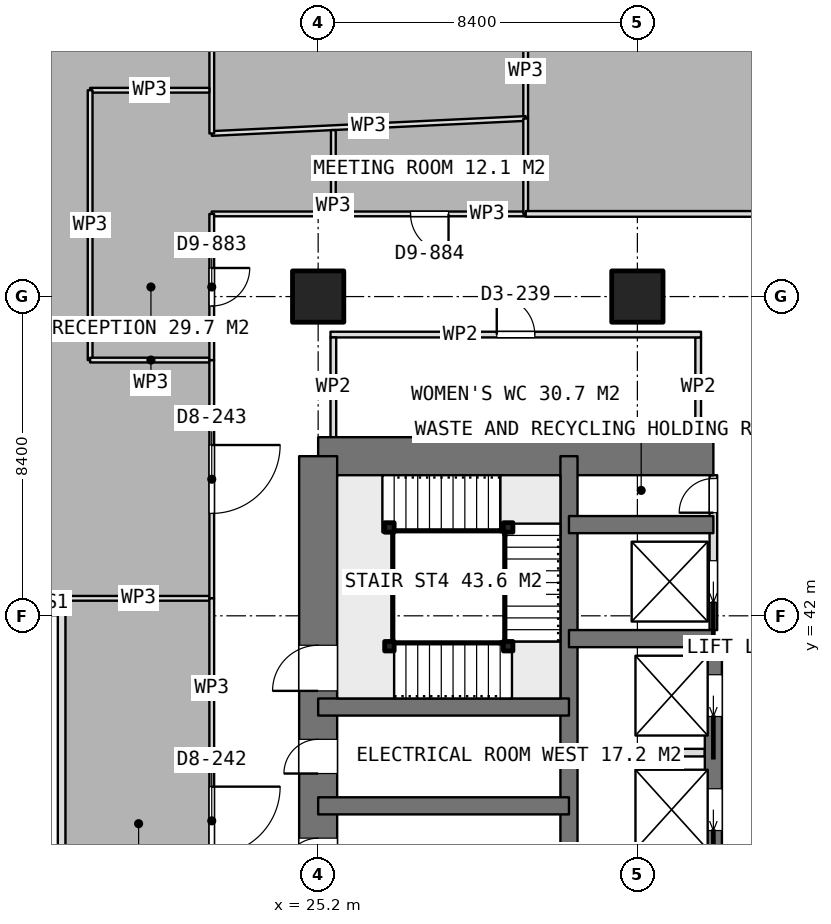
"""IFC4 building model, lengths in metres.
Left out: names, types, materials, properties, quantities, classifications, styles, units other than length and angle.
Written with IfcOpenShell. Run it as: python <this file> out.ifc"""

import sys

from ifc_helpers import new_model, si_unit, direction, frame, frame_2d, origin, origin_2d, place, context, subcontext, project, spatial, rectangle, extrude, element, fill, save


model = new_model("IFC4")
c1 = context("Model", 3, precision=1e-05, world=origin(), true_north=direction((0.0, 1.0)))
c2 = subcontext(c1, "Body", "Model", "MODEL_VIEW")
j1 = project(units=[si_unit("LENGTHUNIT", "METRE"), si_unit("PLANEANGLEUNIT", "RADIAN")], contexts=[c1])
p1 = place(None, origin())
s1 = spatial("IfcSite", under=j1, at=p1, CompositionType="ELEMENT")
p2 = place(p1, origin())
s2 = spatial("IfcBuilding", under=s1, at=p2, CompositionType="ELEMENT")
p3 = place(p2, frame((0.0, 0.0, 221.45)))
s3 = spatial("IfcBuildingStorey", under=s2, at=p3, CompositionType="ELEMENT", Elevation=221.45)
p4 = place(p3, frame((25.2, 46.2, 0.0), z_axis=(0.0, 0.0, 1.0), x_axis=(1.0, 0.0, 0.0)))
e1 = element("IfcWall", 1, at=p4, inside=s3, PredefinedType="SHEAR", context=c2, shape_type="SweptSolid", body=[
    extrude(rectangle(XDim=10.4, YDim=1.0, at=frame_2d((5.2, 0.0))), origin(), (0.0, 0.0, 1.0), 3.75),
])
p5 = place(p3, frame((25.2, 21.0, 0.0), z_axis=(0.0, 0.0, 1.0), x_axis=(0.0, 1.0, 0.0)))
e2 = element("IfcWall", 2, at=p5, inside=s3, PredefinedType="SHEAR", context=c2, shape_type="SweptSolid", body=[
    extrude(rectangle(XDim=25.2, YDim=1.0, at=frame_2d((12.6, 0.0))), origin(), (0.0, 0.0, 1.0), 3.75),
])
p6 = place(p5, frame((7.8, 0.0, 0.0)))
e3 = element("IfcOpeningElement", 3, at=p6, cuts=e2, PredefinedType="OPENING", context=c2, shape_type="SweptSolid", body=[
    extrude(rectangle(XDim=1.2, YDim=2.1, at=frame_2d((0.6, 1.05))), frame((0.0, 0.51, 0.0), z_axis=(0.0, -1.0, 0.0), x_axis=(1.0, 0.0, 0.0)), (0.0, 0.0, 1.0), 1.02),
])
p7 = place(p5, frame((14.25, 0.0, 0.0)))
e4 = element("IfcOpeningElement", 4, at=p7, cuts=e2, PredefinedType="OPENING", context=c2, shape_type="SweptSolid", body=[
    extrude(rectangle(XDim=0.9, YDim=2.1, at=frame_2d((0.45, 1.05))), frame((0.0, 0.51, 0.0), z_axis=(0.0, -1.0, 0.0), x_axis=(1.0, 0.0, 0.0)), (0.0, 0.0, 1.0), 1.02),
])
p8 = place(p5, frame((16.85, 0.0, 0.0)))
e5 = element("IfcOpeningElement", 5, at=p8, cuts=e2, PredefinedType="OPENING", context=c2, shape_type="SweptSolid", body=[
    extrude(rectangle(XDim=0.9, YDim=2.1, at=frame_2d((0.45, 1.05))), frame((0.0, 0.51, 0.0), z_axis=(0.0, -1.0, 0.0), x_axis=(1.0, 0.0, 0.0)), (0.0, 0.0, 1.0), 1.02),
])
p9 = place(p5, frame((19.025, 0.0, 0.0)))
e6 = element("IfcOpeningElement", 6, at=p9, cuts=e2, PredefinedType="OPENING", context=c2, shape_type="SweptSolid", body=[
    extrude(rectangle(XDim=1.2, YDim=2.1, at=frame_2d((0.6, 1.05))), frame((0.0, 0.51, 0.0), z_axis=(0.0, -1.0, 0.0), x_axis=(1.0, 0.0, 0.0)), (0.0, 0.0, 1.0), 1.02),
])
p10 = place(p3, frame((31.8, 21.0, 0.0), z_axis=(0.0, 0.0, 1.0), x_axis=(0.0, 1.0, 0.0)))
e7 = element("IfcWall", 7, at=p10, inside=s3, PredefinedType="SHEAR", context=c2, shape_type="SweptSolid", body=[
    extrude(rectangle(XDim=25.2, YDim=0.45, at=frame_2d((12.6, 0.0))), origin(), (0.0, 0.0, 1.0), 3.75),
])
p11 = place(p3, frame((35.6, 23.4, 0.0), z_axis=(0.0, 0.0, 1.0), x_axis=(0.0, 1.0, 0.0)))
e8 = element("IfcWall", 8, at=p11, inside=s3, PredefinedType="SHEAR", context=c2, shape_type="SweptSolid", body=[
    extrude(rectangle(XDim=18.0, YDim=0.45, at=frame_2d((9.0, 0.0))), origin(), (0.0, 0.0, 1.0), 3.75),
])
p12 = place(p11, frame((0.95, 0.0, 0.0)))
e9 = element("IfcOpeningElement", 9, at=p12, cuts=e8, PredefinedType="OPENING", context=c2, shape_type="SweptSolid", body=[
    extrude(rectangle(XDim=1.1, YDim=2.1, at=frame_2d((0.55, 1.05))), frame((0.0, 0.235, 0.0), z_axis=(0.0, -1.0, 0.0), x_axis=(1.0, 0.0, 0.0)), (0.0, 0.0, 1.0), 0.47),
])
p13 = place(p11, frame((3.95, 0.0, 0.0)))
e10 = element("IfcOpeningElement", 10, at=p13, cuts=e8, PredefinedType="OPENING", context=c2, shape_type="SweptSolid", body=[
    extrude(rectangle(XDim=1.1, YDim=2.1, at=frame_2d((0.55, 1.05))), frame((0.0, 0.235, 0.0), z_axis=(0.0, -1.0, 0.0), x_axis=(1.0, 0.0, 0.0)), (0.0, 0.0, 1.0), 0.47),
])
p14 = place(p11, frame((6.95, 0.0, 0.0)))
e11 = element("IfcOpeningElement", 11, at=p14, cuts=e8, PredefinedType="OPENING", context=c2, shape_type="SweptSolid", body=[
    extrude(rectangle(XDim=1.1, YDim=2.1, at=frame_2d((0.55, 1.05))), frame((0.0, 0.235, 0.0), z_axis=(0.0, -1.0, 0.0), x_axis=(1.0, 0.0, 0.0)), (0.0, 0.0, 1.0), 0.47),
])
p15 = place(p11, frame((9.95, 0.0, 0.0)))
e12 = element("IfcOpeningElement", 12, at=p15, cuts=e8, PredefinedType="OPENING", context=c2, shape_type="SweptSolid", body=[
    extrude(rectangle(XDim=1.1, YDim=2.1, at=frame_2d((0.55, 1.05))), frame((0.0, 0.235, 0.0), z_axis=(0.0, -1.0, 0.0), x_axis=(1.0, 0.0, 0.0)), (0.0, 0.0, 1.0), 0.47),
])
p16 = place(p11, frame((12.95, 0.0, 0.0)))
e13 = element("IfcOpeningElement", 13, at=p16, cuts=e8, PredefinedType="OPENING", context=c2, shape_type="SweptSolid", body=[
    extrude(rectangle(XDim=1.1, YDim=2.1, at=frame_2d((0.55, 1.05))), frame((0.0, 0.235, 0.0), z_axis=(0.0, -1.0, 0.0), x_axis=(1.0, 0.0, 0.0)), (0.0, 0.0, 1.0), 0.47),
])
p17 = place(p11, frame((15.95, 0.0, 0.0)))
e14 = element("IfcOpeningElement", 14, at=p17, cuts=e8, PredefinedType="OPENING", context=c2, shape_type="SweptSolid", body=[
    extrude(rectangle(XDim=1.1, YDim=2.1, at=frame_2d((0.55, 1.05))), frame((0.0, 0.235, 0.0), z_axis=(0.0, -1.0, 0.0), x_axis=(1.0, 0.0, 0.0)), (0.0, 0.0, 1.0), 0.47),
])
for number, where, z_axis, x_axis in (
    (15, (31.8, 41.4, 0.0), (0.0, 0.0, 1.0), (1.0, 0.0, 0.0)),
    (16, (31.8, 44.4, 0.0), (0.0, 0.0, 1.0), (1.0, 0.0, 0.0)),
):
    element("IfcWall", number, at=place(p3, frame(where, z_axis=z_axis, x_axis=x_axis)), inside=s3, PredefinedType="SHEAR", context=c2, shape_type="SweptSolid", body=[
        extrude(rectangle(XDim=3.8, YDim=0.45, at=frame_2d((1.9, 0.0))), origin(), (0.0, 0.0, 1.0), 3.75),
    ])
for number, where, z_axis, x_axis in (
    (17, (25.2, 37.0, 0.0), (0.0, 0.0, 1.0), (1.0, 0.0, 0.0)),
    (18, (25.2, 39.6, 0.0), (0.0, 0.0, 1.0), (1.0, 0.0, 0.0)),
):
    element("IfcWall", number, at=place(p3, frame(where, z_axis=z_axis, x_axis=x_axis)), inside=s3, PredefinedType="SHEAR", context=c2, shape_type="SweptSolid", body=[
        extrude(rectangle(XDim=6.6, YDim=0.45, at=frame_2d((3.3, 0.0))), origin(), (0.0, 0.0, 1.0), 3.75),
    ])
for number, where, z_axis, x_axis in (
    (19, (25.2, 50.4, 0.0), (0.0, 0.0, 1.0), (1.0, 0.0, 0.0)),
    (20, (33.6, 50.4, 0.0), (0.0, 0.0, 1.0), (1.0, 0.0, 0.0)),
):
    element("IfcColumn", number, at=place(p3, frame(where, z_axis=z_axis, x_axis=x_axis)), inside=s3, PredefinedType="COLUMN", context=c2, shape_type="SweptSolid", body=[
        extrude(rectangle(XDim=1.35, YDim=1.35, at=origin_2d()), origin(), (0.0, 0.0, 1.0), 3.75),
    ])
p18 = place(p3, frame((32.025, 38.4, 0.0), z_axis=(0.0, 0.0, 1.0), x_axis=(1.0, 0.0, 0.0)))
e21 = element("IfcWall", 21, at=p18, inside=s3, PredefinedType="PARTITIONING", context=c2, shape_type="SweptSolid", body=[
    extrude(rectangle(XDim=3.35, YDim=0.2, at=frame_2d((1.675, 0.0))), origin(), (0.0, 0.0, 1.0), 3.5),
])
p19 = place(p3, frame((35.6, 41.625, 0.0), z_axis=(0.0, 0.0, 1.0), x_axis=(0.0, 1.0, 0.0)))
e22 = element("IfcWall", 22, at=p19, inside=s3, PredefinedType="PARTITIONING", context=c2, shape_type="SweptSolid", body=[
    extrude(rectangle(XDim=4.075, YDim=0.2, at=frame_2d((2.038, 0.0))), origin(), (0.0, 0.0, 1.0), 3.5),
])
p20 = place(p19, frame((3.088, 0.0, 0.0)))
e23 = element("IfcOpeningElement", 23, at=p20, cuts=e22, PredefinedType="OPENING", context=c2, shape_type="SweptSolid", body=[
    extrude(rectangle(XDim=0.9, YDim=2.1, at=frame_2d((0.45, 1.05))), frame((0.0, 0.11, 0.0), z_axis=(0.0, -1.0, 0.0), x_axis=(1.0, 0.0, 0.0)), (0.0, 0.0, 1.0), 0.22),
])
p21 = place(p19, frame((0.725, 0.0, 0.0)))
e24 = element("IfcOpeningElement", 24, at=p21, cuts=e22, PredefinedType="OPENING", context=c2, shape_type="SweptSolid", body=[
    extrude(rectangle(XDim=1.1, YDim=2.1, at=frame_2d((0.55, 1.05))), frame((0.0, 0.11, 0.0), z_axis=(0.0, -1.0, 0.0), x_axis=(1.0, 0.0, 0.0)), (0.0, 0.0, 1.0), 0.22),
])
p22 = place(p3, frame((25.525, 49.4, 0.0), z_axis=(0.0, 0.0, 1.0), x_axis=(1.0, 0.0, 0.0)))
e25 = element("IfcWall", 25, at=p22, inside=s3, PredefinedType="PARTITIONING", context=c2, shape_type="SweptSolid", body=[
    extrude(rectangle(XDim=9.75, YDim=0.15, at=frame_2d((4.875, 0.0))), origin(), (0.0, 0.0, 1.0), 3.5),
])
p23 = place(p22, frame((4.375, 0.0, 0.0)))
e26 = element("IfcOpeningElement", 26, at=p23, cuts=e25, PredefinedType="OPENING", context=c2, shape_type="SweptSolid", body=[
    extrude(rectangle(XDim=1.0, YDim=2.1, at=frame_2d((0.5, 1.05))), frame((0.0, 0.085, 0.0), z_axis=(0.0, -1.0, 0.0), x_axis=(1.0, 0.0, 0.0)), (0.0, 0.0, 1.0), 0.17),
])
for number, where, z_axis, x_axis in (
    (27, (25.6, 46.7, 0.0), (0.0, 0.0, 1.0), (0.0, 1.0, 0.0)),
    (28, (35.2, 46.7, 0.0), (0.0, 0.0, 1.0), (0.0, 1.0, 0.0)),
):
    element("IfcWall", number, at=place(p3, frame(where, z_axis=z_axis, x_axis=x_axis)), inside=s3, PredefinedType="PARTITIONING", context=c2, shape_type="SweptSolid", body=[
        extrude(rectangle(XDim=2.625, YDim=0.15, at=frame_2d((1.312, 0.0))), origin(), (0.0, 0.0, 1.0), 3.5),
    ])
p24 = place(p3, frame((30.661, 61.313, 0.0), z_axis=(0.0, 0.0, 1.0), x_axis=(0.0, -1.0, 0.0)))
e29 = element("IfcWall", 29, at=p24, inside=s3, PredefinedType="PARTITIONING", context=c2, shape_type="SweptSolid", body=[
    extrude(rectangle(XDim=6.227, YDim=0.125, at=frame_2d((3.114, 0.0))), origin(), (0.0, 0.0, 1.0), 3.5),
])
p25 = place(p24, frame((2.614, 0.0, 0.0)))
e30 = element("IfcOpeningElement", 30, at=p25, cuts=e29, PredefinedType="OPENING", context=c2, shape_type="SweptSolid", body=[
    extrude(rectangle(XDim=1.0, YDim=2.1, at=frame_2d((0.5, 1.05))), frame((0.0, 0.073, 0.0), z_axis=(0.0, -1.0, 0.0), x_axis=(1.0, 0.0, 0.0)), (0.0, 0.0, 1.0), 0.145),
])
p26 = place(p3, frame((30.661, 55.086, 0.0), z_axis=(0.0, 0.0, 1.0), x_axis=(-0.998858431805, -0.047768537897, 0.0)))
e31 = element("IfcWall", 31, at=p26, inside=s3, PredefinedType="PARTITIONING", context=c2, shape_type="SweptSolid", body=[
    extrude(rectangle(XDim=8.27, YDim=0.125, at=frame_2d((4.135, 0.0))), origin(), (0.0, 0.0, 1.0), 3.5),
])
p27 = place(p3, frame((22.401, 54.691, 0.0), z_axis=(0.0, 0.0, 1.0), x_axis=(0.0, 1.0, 0.0)))
e32 = element("IfcWall", 32, at=p27, inside=s3, PredefinedType="PARTITIONING", context=c2, shape_type="SweptSolid", body=[
    extrude(rectangle(XDim=6.257, YDim=0.125, at=frame_2d((3.128, 0.0))), origin(), (0.0, 0.0, 1.0), 3.5),
])
p28 = place(p3, frame((22.4, 42.46, 0.0), z_axis=(0.0, 0.0, 1.0), x_axis=(-1.0, 0.0, 0.0)))
e33 = element("IfcWall", 33, at=p28, inside=s3, PredefinedType="PARTITIONING", context=c2, shape_type="SweptSolid", body=[
    extrude(rectangle(XDim=3.849, YDim=0.125, at=frame_2d((1.924, 0.0))), origin(), (0.0, 0.0, 1.0), 3.5),
])
p29 = place(p3, frame((22.338, 55.829, 0.0), z_axis=(0.0, 0.0, 1.0), x_axis=(-1.0, 0.0, 0.0)))
e34 = element("IfcWall", 34, at=p29, inside=s3, PredefinedType="PARTITIONING", context=c2, shape_type="SweptSolid", body=[
    extrude(rectangle(XDim=3.138, YDim=0.125, at=frame_2d((1.569, 0.0))), origin(), (0.0, 0.0, 1.0), 3.5),
])
p30 = place(p3, frame((19.2, 55.829, 0.0), z_axis=(0.0, 0.0, 1.0), x_axis=(0.0, -1.0, 0.0)))
e35 = element("IfcWall", 35, at=p30, inside=s3, PredefinedType="PARTITIONING", context=c2, shape_type="SweptSolid", body=[
    extrude(rectangle(XDim=7.1, YDim=0.125, at=frame_2d((3.55, 0.0))), origin(), (0.0, 0.0, 1.0), 3.5),
])
p31 = place(p3, frame((19.2, 48.729, 0.0), z_axis=(0.0, 0.0, 1.0), x_axis=(1.0, 0.0, 0.0)))
e36 = element("IfcWall", 36, at=p31, inside=s3, PredefinedType="PARTITIONING", context=c2, shape_type="SweptSolid", body=[
    extrude(rectangle(XDim=3.2, YDim=0.125, at=frame_2d((1.6, 0.0))), origin(), (0.0, 0.0, 1.0), 3.5),
])
p32 = place(p3, frame((22.4, 48.729, 0.0), z_axis=(0.0, 0.0, 1.0), x_axis=(0.0, -1.0, 0.0)))
e37 = element("IfcWall", 37, at=p32, inside=s3, PredefinedType="PARTITIONING", context=c2, shape_type="SweptSolid", body=[
    extrude(rectangle(XDim=6.269, YDim=0.125, at=frame_2d((3.135, 0.0))), origin(), (0.0, 0.0, 1.0), 3.5),
])
p33 = place(p32, frame((2.235, 0.0, 0.0)))
e38 = element("IfcOpeningElement", 38, at=p33, cuts=e37, PredefinedType="OPENING", context=c2, shape_type="SweptSolid", body=[
    extrude(rectangle(XDim=1.8, YDim=2.1, at=frame_2d((0.9, 1.05))), frame((0.0, 0.073, 0.0), z_axis=(0.0, -1.0, 0.0), x_axis=(1.0, 0.0, 0.0)), (0.0, 0.0, 1.0), 0.145),
])
p34 = place(p3, frame((25.6, 54.781, 0.0), z_axis=(0.0, 0.0, 1.0), x_axis=(0.0, -1.0, 0.0)))
e39 = element("IfcWall", 39, at=p34, inside=s3, PredefinedType="PARTITIONING", context=c2, shape_type="SweptSolid", body=[
    extrude(rectangle(XDim=2.206, YDim=0.125, at=frame_2d((1.103, 0.0))), origin(), (0.0, 0.0, 1.0), 3.5),
])
p35 = place(p3, frame((25.6, 52.575, 0.0), z_axis=(0.0, 0.0, 1.0), x_axis=(-1.0, 0.0, 0.0)))
e40 = element("IfcWall", 40, at=p35, inside=s3, PredefinedType="PARTITIONING", context=c2, shape_type="SweptSolid", body=[
    extrude(rectangle(XDim=3.2, YDim=0.125, at=frame_2d((1.6, 0.0))), origin(), (0.0, 0.0, 1.0), 3.5),
])
p36 = place(p3, frame((22.4, 52.575, 0.0), z_axis=(0.0, 0.0, 1.0), x_axis=(0.0, -1.0, 0.0)))
e41 = element("IfcWall", 41, at=p36, inside=s3, PredefinedType="PARTITIONING", context=c2, shape_type="SweptSolid", body=[
    extrude(rectangle(XDim=3.846, YDim=0.125, at=frame_2d((1.923, 0.0))), origin(), (0.0, 0.0, 1.0), 3.5),
])
p37 = place(p36, frame((1.423, 0.0, 0.0)))
e42 = element("IfcOpeningElement", 42, at=p37, cuts=e41, PredefinedType="OPENING", context=c2, shape_type="SweptSolid", body=[
    extrude(rectangle(XDim=1.0, YDim=2.1, at=frame_2d((0.5, 1.05))), frame((0.0, 0.073, 0.0), z_axis=(0.0, -1.0, 0.0), x_axis=(1.0, 0.0, 0.0)), (0.0, 0.0, 1.0), 0.145),
])
p38 = place(p3, frame((30.661, 52.575, 0.0), z_axis=(0.0, 0.0, 1.0), x_axis=(-1.0, 0.0, 0.0)))
e43 = element("IfcWall", 43, at=p38, inside=s3, PredefinedType="PARTITIONING", context=c2, shape_type="SweptSolid", body=[
    extrude(rectangle(XDim=5.061, YDim=0.125, at=frame_2d((2.53, 0.0))), origin(), (0.0, 0.0, 1.0), 3.5),
])
p39 = place(p38, frame((2.03, 0.0, 0.0)))
e44 = element("IfcOpeningElement", 44, at=p39, cuts=e43, PredefinedType="OPENING", context=c2, shape_type="SweptSolid", body=[
    extrude(rectangle(XDim=1.0, YDim=2.1, at=frame_2d((0.5, 1.05))), frame((0.0, 0.073, 0.0), z_axis=(0.0, -1.0, 0.0), x_axis=(1.0, 0.0, 0.0)), (0.0, 0.0, 1.0), 0.145),
])
p40 = place(p3, frame((30.661, 55.086, 0.0), z_axis=(0.0, 0.0, 1.0), x_axis=(0.0, -1.0, 0.0)))
e45 = element("IfcWall", 45, at=p40, inside=s3, PredefinedType="PARTITIONING", context=c2, shape_type="SweptSolid", body=[
    extrude(rectangle(XDim=2.511, YDim=0.125, at=frame_2d((1.255, 0.0))), origin(), (0.0, 0.0, 1.0), 3.5),
])
p41 = place(p3, frame((53.2, 52.575, 0.0), z_axis=(0.0, 0.0, 1.0), x_axis=(-1.0, 0.0, 0.0)))
e46 = element("IfcWall", 46, at=p41, inside=s3, PredefinedType="PARTITIONING", context=c2, shape_type="SweptSolid", body=[
    extrude(rectangle(XDim=22.539, YDim=0.15, at=frame_2d((11.27, 0.0))), origin(), (0.0, 0.0, 1.0), 3.5),
])
p42 = place(p3, frame((22.4, 42.46, 0.0), z_axis=(0.0, 0.0, 1.0), x_axis=(0.0, -1.0, 0.0)))
e47 = element("IfcWall", 47, at=p42, inside=s3, PredefinedType="PARTITIONING", context=c2, shape_type="SweptSolid", body=[
    extrude(rectangle(XDim=11.849, YDim=0.125, at=frame_2d((5.924, 0.0))), origin(), (0.0, 0.0, 1.0), 3.5),
])
p43 = place(p42, frame((4.955, 0.0, 0.0)))
e48 = element("IfcOpeningElement", 48, at=p43, cuts=e47, PredefinedType="OPENING", context=c2, shape_type="SweptSolid", body=[
    extrude(rectangle(XDim=1.8, YDim=2.1, at=frame_2d((0.9, 1.05))), frame((0.0, 0.073, 0.0), z_axis=(0.0, -1.0, 0.0), x_axis=(1.0, 0.0, 0.0)), (0.0, 0.0, 1.0), 0.145),
])
for number, where, z_axis, x_axis in (
    (49, (27.075, 41.2, 0.0), (0.0, 0.0, 1.0), (1.0, 0.0, 0.0)),
    (50, (30.2, 41.2, 0.0), (0.0, 0.0, 1.0), (1.0, 0.0, 0.0)),
    (51, (30.2, 44.325, 0.0), (0.0, 0.0, 1.0), (1.0, 0.0, 0.0)),
    (52, (27.075, 44.325, 0.0), (0.0, 0.0, 1.0), (1.0, 0.0, 0.0)),
):
    element("IfcColumn", number, at=place(p3, frame(where, z_axis=z_axis, x_axis=x_axis)), inside=s3, PredefinedType="COLUMN", context=c2, shape_type="SweptSolid", body=[
        extrude(rectangle(XDim=0.25, YDim=0.25, at=origin_2d()), origin(), (0.0, 0.0, 1.0), 3.75),
    ])
p44 = place(p3, frame((18.45, 24.412, 0.0), z_axis=(0.0, 0.0, 1.0), x_axis=(0.0, 1.0, 0.0)))
e53 = element("IfcWall", 53, at=p44, inside=s3, PredefinedType="PARTITIONING", context=c2, shape_type="SweptSolid", body=[
    extrude(rectangle(XDim=17.816, YDim=0.2, at=frame_2d((8.908, 0.0))), origin(), (0.0, 0.0, 1.0), 3.5),
])
p45 = place(p44, frame((4.388, 0.0, 0.0)))
e54 = element("IfcOpeningElement", 54, at=p45, cuts=e53, PredefinedType="OPENING", context=c2, shape_type="SweptSolid", body=[
    extrude(rectangle(XDim=1.2, YDim=2.1, at=frame_2d((0.6, 1.05))), frame((0.0, 0.11, 0.0), z_axis=(0.0, -1.0, 0.0), x_axis=(1.0, 0.0, 0.0)), (0.0, 0.0, 1.0), 0.22),
])
p46 = place(p3, frame((17.475, 42.328, 0.0), z_axis=(0.0, 0.0, 1.0), x_axis=(1.0, 0.0, 0.0)))
e55 = element("IfcWall", 55, at=p46, inside=s3, PredefinedType="PARTITIONING", context=c2, shape_type="SweptSolid", body=[
    extrude(rectangle(XDim=1.075, YDim=0.2, at=frame_2d((0.538, 0.0))), origin(), (0.0, 0.0, 1.0), 3.5),
])
p47 = place(p7, origin())
e56 = element("IfcDoor", 56, at=p47, inside=s3, OperationType="SINGLE_SWING_LEFT", PredefinedType="DOOR", context=c2, shape_type="SweptSolid", body=[
    extrude(rectangle(XDim=0.9, YDim=2.1, at=frame_2d((0.45, 1.05))), frame((0.0, 0.025, 0.0), z_axis=(0.0, -1.0, 0.0), x_axis=(1.0, 0.0, 0.0)), (0.0, 0.0, 1.0), 0.05),
])
fill(e4, e56)
p48 = place(p8, origin())
e57 = element("IfcDoor", 57, at=p48, inside=s3, OperationType="SINGLE_SWING_LEFT", PredefinedType="DOOR", context=c2, shape_type="SweptSolid", body=[
    extrude(rectangle(XDim=0.9, YDim=2.1, at=frame_2d((0.45, 1.05))), frame((0.0, 0.025, 0.0), z_axis=(0.0, -1.0, 0.0), x_axis=(1.0, 0.0, 0.0)), (0.0, 0.0, 1.0), 0.05),
])
fill(e5, e57)
p49 = place(p20, origin())
e58 = element("IfcDoor", 58, at=p49, inside=s3, OperationType="SINGLE_SWING_LEFT", PredefinedType="DOOR", context=c2, shape_type="SweptSolid", body=[
    extrude(rectangle(XDim=0.9, YDim=2.1, at=frame_2d((0.45, 1.05))), frame((0.0, 0.025, 0.0), z_axis=(0.0, -1.0, 0.0), x_axis=(1.0, 0.0, 0.0)), (0.0, 0.0, 1.0), 0.05),
])
fill(e23, e58)
p50 = place(p16, origin())
e59 = element("IfcDoor", 59, at=p50, inside=s3, OperationType="SLIDING_TO_LEFT", PredefinedType="USERDEFINED", context=c2, shape_type="SweptSolid", body=[
    extrude(rectangle(XDim=1.1, YDim=2.1, at=frame_2d((0.55, 1.05))), frame((0.0, 0.025, 0.0), z_axis=(0.0, -1.0, 0.0), x_axis=(1.0, 0.0, 0.0)), (0.0, 0.0, 1.0), 0.05),
])
fill(e13, e59)
p51 = place(p17, origin())
e60 = element("IfcDoor", 60, at=p51, inside=s3, OperationType="SLIDING_TO_LEFT", PredefinedType="USERDEFINED", context=c2, shape_type="SweptSolid", body=[
    extrude(rectangle(XDim=1.1, YDim=2.1, at=frame_2d((0.55, 1.05))), frame((0.0, 0.025, 0.0), z_axis=(0.0, -1.0, 0.0), x_axis=(1.0, 0.0, 0.0)), (0.0, 0.0, 1.0), 0.05),
])
fill(e14, e60)
p52 = place(p21, origin())
e61 = element("IfcDoor", 61, at=p52, inside=s3, OperationType="SLIDING_TO_LEFT", PredefinedType="USERDEFINED", context=c2, shape_type="SweptSolid", body=[
    extrude(rectangle(XDim=1.1, YDim=2.1, at=frame_2d((0.55, 1.05))), frame((0.0, 0.025, 0.0), z_axis=(0.0, -1.0, 0.0), x_axis=(1.0, 0.0, 0.0)), (0.0, 0.0, 1.0), 0.05),
])
fill(e24, e61)
p53 = place(p23, origin())
e62 = element("IfcDoor", 62, at=p53, inside=s3, OperationType="SINGLE_SWING_LEFT", PredefinedType="DOOR", context=c2, shape_type="SweptSolid", body=[
    extrude(rectangle(XDim=1.0, YDim=2.1, at=frame_2d((0.5, 1.05))), frame((0.0, 0.025, 0.0), z_axis=(0.0, -1.0, 0.0), x_axis=(1.0, 0.0, 0.0)), (0.0, 0.0, 1.0), 0.05),
])
fill(e26, e62)
p54 = place(p33, origin())
e63 = element("IfcDoor", 63, at=p54, inside=s3, OperationType="DOUBLE_DOOR_SINGLE_SWING", PredefinedType="DOOR", context=c2, shape_type="SweptSolid", body=[
    extrude(rectangle(XDim=1.8, YDim=2.1, at=frame_2d((0.9, 1.05))), frame((0.0, 0.025, 0.0), z_axis=(0.0, -1.0, 0.0), x_axis=(1.0, 0.0, 0.0)), (0.0, 0.0, 1.0), 0.05),
])
fill(e38, e63)
p55 = place(p37, origin())
e64 = element("IfcDoor", 64, at=p55, inside=s3, OperationType="SINGLE_SWING_LEFT", PredefinedType="DOOR", context=c2, shape_type="SweptSolid", body=[
    extrude(rectangle(XDim=1.0, YDim=2.1, at=frame_2d((0.5, 1.05))), frame((0.0, 0.025, 0.0), z_axis=(0.0, -1.0, 0.0), x_axis=(1.0, 0.0, 0.0)), (0.0, 0.0, 1.0), 0.05),
])
fill(e42, e64)
p56 = place(p39, origin())
e65 = element("IfcDoor", 65, at=p56, inside=s3, OperationType="SINGLE_SWING_LEFT", PredefinedType="DOOR", context=c2, shape_type="SweptSolid", body=[
    extrude(rectangle(XDim=1.0, YDim=2.1, at=frame_2d((0.5, 1.05))), frame((0.0, 0.025, 0.0), z_axis=(0.0, -1.0, 0.0), x_axis=(1.0, 0.0, 0.0)), (0.0, 0.0, 1.0), 0.05),
])
fill(e44, e65)
p57 = place(p43, origin())
e66 = element("IfcDoor", 66, at=p57, inside=s3, OperationType="DOUBLE_DOOR_SINGLE_SWING", PredefinedType="DOOR", context=c2, shape_type="SweptSolid", body=[
    extrude(rectangle(XDim=1.8, YDim=2.1, at=frame_2d((0.9, 1.05))), frame((0.0, 0.025, 0.0), z_axis=(0.0, -1.0, 0.0), x_axis=(1.0, 0.0, 0.0)), (0.0, 0.0, 1.0), 0.05),
])
fill(e48, e66)
p58 = place(p9, origin())
e67 = element("IfcDoor", 67, at=p58, inside=s3, OperationType="SINGLE_SWING_RIGHT", PredefinedType="DOOR", context=c2, shape_type="SweptSolid", body=[
    extrude(rectangle(XDim=1.2, YDim=2.1, at=frame_2d((0.6, 1.05))), frame((0.0, 0.025, 0.0), z_axis=(0.0, -1.0, 0.0), x_axis=(1.0, 0.0, 0.0)), (0.0, 0.0, 1.0), 0.05),
])
fill(e6, e67)
save(model, sys.argv[1])
